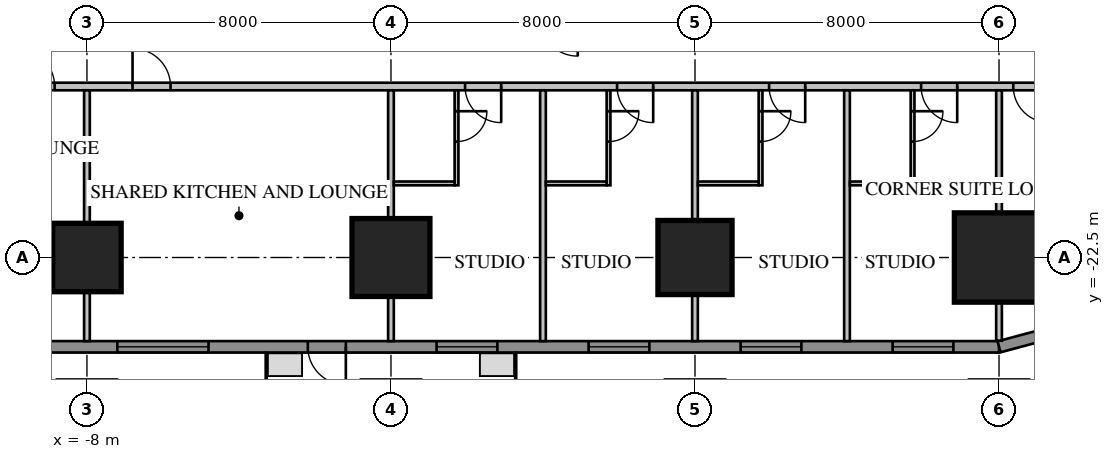
"""IFC4 building model, lengths in metres.
Left out: names, types, materials, properties, quantities, classifications, styles, units other than length and angle.
Written with IfcOpenShell. Run it as: python <this file> out.ifc"""

import sys

from ifc_helpers import new_model, si_unit, direction, frame, frame_2d, origin, origin_2d, place, context, subcontext, project, spatial, rectangle, extrude, element, fill, save


model = new_model("IFC4")
c1 = context("Model", 3, precision=1e-05, world=origin(), true_north=direction((0.0, 1.0)))
c2 = subcontext(c1, "Body", "Model", "MODEL_VIEW")
j1 = project(units=[si_unit("LENGTHUNIT", "METRE"), si_unit("PLANEANGLEUNIT", "RADIAN")], contexts=[c1])
p1 = place(None, origin())
s1 = spatial("IfcSite", under=j1, at=p1, CompositionType="ELEMENT")
p2 = place(p1, origin())
s2 = spatial("IfcBuilding", under=s1, at=p2, CompositionType="ELEMENT")
p3 = place(p2, frame((0.0, 0.0, 46.8)))
s3 = spatial("IfcBuildingStorey", under=s2, at=p3, CompositionType="ELEMENT", Elevation=46.8)
p4 = place(p3, frame((-8.0, -22.5, 0.0), z_axis=(0.0, 0.0, 1.0), x_axis=(1.0, 0.0, 0.0)))
e1 = element("IfcColumn", 1, at=p4, inside=s3, PredefinedType="COLUMN", context=c2, shape_type="SweptSolid", body=[
    extrude(rectangle(XDim=1.8, YDim=1.8, at=origin_2d()), origin(), (0.0, 0.0, 1.0), 3.85),
])
p5 = place(p3, frame((0.0, -22.5, 0.0), z_axis=(0.0, 0.0, 1.0), x_axis=(1.0, 0.0, 0.0)))
e2 = element("IfcColumn", 2, at=p5, inside=s3, PredefinedType="COLUMN", context=c2, shape_type="SweptSolid", body=[
    extrude(rectangle(XDim=2.05, YDim=2.05, at=origin_2d()), origin(), (0.0, 0.0, 1.0), 3.85),
])
p6 = place(p3, frame((8.0, -22.5, 0.0), z_axis=(0.0, 0.0, 1.0), x_axis=(1.0, 0.0, 0.0)))
e3 = element("IfcColumn", 3, at=p6, inside=s3, PredefinedType="COLUMN", context=c2, shape_type="SweptSolid", body=[
    extrude(rectangle(XDim=1.95, YDim=1.95, at=origin_2d()), origin(), (0.0, 0.0, 1.0), 3.85),
])
p7 = place(p3, frame((16.0, -22.5, 0.0), z_axis=(0.0, 0.0, 1.0), x_axis=(1.0, 0.0, 0.0)))
e4 = element("IfcColumn", 4, at=p7, inside=s3, PredefinedType="COLUMN", context=c2, shape_type="SweptSolid", body=[
    extrude(rectangle(XDim=2.35, YDim=2.35, at=origin_2d()), origin(), (0.0, 0.0, 1.0), 3.85),
])
p8 = place(p3, frame((-16.0, -24.85, 0.0), z_axis=(0.0, 0.0, 1.0), x_axis=(1.0, 0.0, 0.0)))
e5 = element("IfcWall", 5, at=p8, inside=s3, PredefinedType="SOLIDWALL", context=c2, shape_type="SweptSolid", body=[
    extrude(rectangle(XDim=32.0, YDim=0.3, at=frame_2d((16.0, 0.0))), origin(), (0.0, 0.0, 1.0), 3.65),
])
p9 = place(p8, frame((1.2, 0.0, 0.75)))
e6 = element("IfcOpeningElement", 6, at=p9, cuts=e5, PredefinedType="OPENING", context=c2, shape_type="SweptSolid", body=[
    extrude(rectangle(XDim=1.6, YDim=1.8, at=frame_2d((0.8, 0.9))), frame((0.0, 0.17, 0.0), z_axis=(0.0, -1.0, 0.0), x_axis=(1.0, 0.0, 0.0)), (0.0, 0.0, 1.0), 0.34),
])
p10 = place(p8, frame((5.2, 0.0, 0.75)))
e7 = element("IfcOpeningElement", 7, at=p10, cuts=e5, PredefinedType="OPENING", context=c2, shape_type="SweptSolid", body=[
    extrude(rectangle(XDim=1.6, YDim=1.8, at=frame_2d((0.8, 0.9))), frame((0.0, 0.17, 0.0), z_axis=(0.0, -1.0, 0.0), x_axis=(1.0, 0.0, 0.0)), (0.0, 0.0, 1.0), 0.34),
])
p11 = place(p8, frame((17.2, 0.0, 0.75)))
e8 = element("IfcOpeningElement", 8, at=p11, cuts=e5, PredefinedType="OPENING", context=c2, shape_type="SweptSolid", body=[
    extrude(rectangle(XDim=1.6, YDim=1.8, at=frame_2d((0.8, 0.9))), frame((0.0, 0.17, 0.0), z_axis=(0.0, -1.0, 0.0), x_axis=(1.0, 0.0, 0.0)), (0.0, 0.0, 1.0), 0.34),
])
p12 = place(p8, frame((21.2, 0.0, 0.75)))
e9 = element("IfcOpeningElement", 9, at=p12, cuts=e5, PredefinedType="OPENING", context=c2, shape_type="SweptSolid", body=[
    extrude(rectangle(XDim=1.6, YDim=1.8, at=frame_2d((0.8, 0.9))), frame((0.0, 0.17, 0.0), z_axis=(0.0, -1.0, 0.0), x_axis=(1.0, 0.0, 0.0)), (0.0, 0.0, 1.0), 0.34),
])
p13 = place(p8, frame((25.2, 0.0, 0.75)))
e10 = element("IfcOpeningElement", 10, at=p13, cuts=e5, PredefinedType="OPENING", context=c2, shape_type="SweptSolid", body=[
    extrude(rectangle(XDim=1.6, YDim=1.8, at=frame_2d((0.8, 0.9))), frame((0.0, 0.17, 0.0), z_axis=(0.0, -1.0, 0.0), x_axis=(1.0, 0.0, 0.0)), (0.0, 0.0, 1.0), 0.34),
])
p14 = place(p8, frame((29.2, 0.0, 0.75)))
e11 = element("IfcOpeningElement", 11, at=p14, cuts=e5, PredefinedType="OPENING", context=c2, shape_type="SweptSolid", body=[
    extrude(rectangle(XDim=1.6, YDim=1.8, at=frame_2d((0.8, 0.9))), frame((0.0, 0.17, 0.0), z_axis=(0.0, -1.0, 0.0), x_axis=(1.0, 0.0, 0.0)), (0.0, 0.0, 1.0), 0.34),
])
p15 = place(p8, frame((8.8, 0.0, 0.75)))
e12 = element("IfcOpeningElement", 12, at=p15, cuts=e5, PredefinedType="OPENING", context=c2, shape_type="SweptSolid", body=[
    extrude(rectangle(XDim=2.4, YDim=1.8, at=frame_2d((1.2, 0.9))), frame((0.0, 0.17, 0.0), z_axis=(0.0, -1.0, 0.0), x_axis=(1.0, 0.0, 0.0)), (0.0, 0.0, 1.0), 0.34),
])
p16 = place(p8, frame((13.812, 0.0, 0.0)))
e13 = element("IfcOpeningElement", 13, at=p16, cuts=e5, PredefinedType="OPENING", context=c2, shape_type="SweptSolid", body=[
    extrude(rectangle(XDim=1.0, YDim=2.4, at=frame_2d((0.5, 1.2))), frame((0.0, 0.17, 0.0), z_axis=(0.0, -1.0, 0.0), x_axis=(1.0, 0.0, 0.0)), (0.0, 0.0, 1.0), 0.34),
])
p17 = place(p3, frame((16.0, -24.85, 0.0), z_axis=(0.0, 0.0, 1.0), x_axis=(0.965920218567, 0.258839972501, 0.0)))
e14 = element("IfcWall", 14, at=p17, inside=s3, PredefinedType="SOLIDWALL", context=c2, shape_type="SweptSolid", body=[
    extrude(rectangle(XDim=4.581, YDim=0.3, at=frame_2d((2.291, 0.0))), origin(), (0.0, 0.0, 1.0), 3.65),
])
p18 = place(p3, frame((-18.0, -18.0, 0.0), z_axis=(0.0, 0.0, 1.0), x_axis=(1.0, 0.0, 0.0)))
e15 = element("IfcWall", 15, at=p18, inside=s3, PredefinedType="PARTITIONING", context=c2, shape_type="SweptSolid", body=[
    extrude(rectangle(XDim=36.0, YDim=0.2, at=frame_2d((18.0, 0.0))), origin(), (0.0, 0.0, 1.0), 3.65),
])
p19 = place(p18, frame((0.375, 0.0, 0.0)))
e16 = element("IfcOpeningElement", 16, at=p19, cuts=e15, PredefinedType="OPENING", context=c2, shape_type="SweptSolid", body=[
    extrude(rectangle(XDim=1.0, YDim=2.1, at=frame_2d((0.5, 1.05))), frame((0.0, 0.12, 0.0), z_axis=(0.0, -1.0, 0.0), x_axis=(1.0, 0.0, 0.0)), (0.0, 0.0, 1.0), 0.24),
])
p20 = place(p18, frame((2.45, 0.0, 0.0)))
e17 = element("IfcOpeningElement", 17, at=p20, cuts=e15, PredefinedType="OPENING", context=c2, shape_type="SweptSolid", body=[
    extrude(rectangle(XDim=0.8, YDim=2.1, at=frame_2d((0.4, 1.05))), frame((0.0, 0.12, 0.0), z_axis=(0.0, -1.0, 0.0), x_axis=(1.0, 0.0, 0.0)), (0.0, 0.0, 1.0), 0.24),
])
p21 = place(p18, frame((4.05, 0.0, 0.0)))
e18 = element("IfcOpeningElement", 18, at=p21, cuts=e15, PredefinedType="OPENING", context=c2, shape_type="SweptSolid", body=[
    extrude(rectangle(XDim=1.0, YDim=2.1, at=frame_2d((0.5, 1.05))), frame((0.0, 0.12, 0.0), z_axis=(0.0, -1.0, 0.0), x_axis=(1.0, 0.0, 0.0)), (0.0, 0.0, 1.0), 0.24),
])
p22 = place(p18, frame((6.45, 0.0, 0.0)))
e19 = element("IfcOpeningElement", 19, at=p22, cuts=e15, PredefinedType="OPENING", context=c2, shape_type="SweptSolid", body=[
    extrude(rectangle(XDim=0.9, YDim=2.1, at=frame_2d((0.45, 1.05))), frame((0.0, 0.12, 0.0), z_axis=(0.0, -1.0, 0.0), x_axis=(1.0, 0.0, 0.0)), (0.0, 0.0, 1.0), 0.24),
])
p23 = place(p18, frame((8.15, 0.0, 0.0)))
e20 = element("IfcOpeningElement", 20, at=p23, cuts=e15, PredefinedType="OPENING", context=c2, shape_type="SweptSolid", body=[
    extrude(rectangle(XDim=1.0, YDim=2.1, at=frame_2d((0.5, 1.05))), frame((0.0, 0.12, 0.0), z_axis=(0.0, -1.0, 0.0), x_axis=(1.0, 0.0, 0.0)), (0.0, 0.0, 1.0), 0.24),
])
p24 = place(p18, frame((19.95, 0.0, 0.0)))
e21 = element("IfcOpeningElement", 21, at=p24, cuts=e15, PredefinedType="OPENING", context=c2, shape_type="SweptSolid", body=[
    extrude(rectangle(XDim=0.95, YDim=2.1, at=frame_2d((0.475, 1.05))), frame((0.0, 0.12, 0.0), z_axis=(0.0, -1.0, 0.0), x_axis=(1.0, 0.0, 0.0)), (0.0, 0.0, 1.0), 0.24),
])
p25 = place(p18, frame((23.95, 0.0, 0.0)))
e22 = element("IfcOpeningElement", 22, at=p25, cuts=e15, PredefinedType="OPENING", context=c2, shape_type="SweptSolid", body=[
    extrude(rectangle(XDim=0.95, YDim=2.1, at=frame_2d((0.475, 1.05))), frame((0.0, 0.12, 0.0), z_axis=(0.0, -1.0, 0.0), x_axis=(1.0, 0.0, 0.0)), (0.0, 0.0, 1.0), 0.24),
])
p26 = place(p18, frame((27.95, 0.0, 0.0)))
e23 = element("IfcOpeningElement", 23, at=p26, cuts=e15, PredefinedType="OPENING", context=c2, shape_type="SweptSolid", body=[
    extrude(rectangle(XDim=0.95, YDim=2.1, at=frame_2d((0.475, 1.05))), frame((0.0, 0.12, 0.0), z_axis=(0.0, -1.0, 0.0), x_axis=(1.0, 0.0, 0.0)), (0.0, 0.0, 1.0), 0.24),
])
p27 = place(p18, frame((31.95, 0.0, 0.0)))
e24 = element("IfcOpeningElement", 24, at=p27, cuts=e15, PredefinedType="OPENING", context=c2, shape_type="SweptSolid", body=[
    extrude(rectangle(XDim=0.95, YDim=2.1, at=frame_2d((0.475, 1.05))), frame((0.0, 0.12, 0.0), z_axis=(0.0, -1.0, 0.0), x_axis=(1.0, 0.0, 0.0)), (0.0, 0.0, 1.0), 0.24),
])
p28 = place(p18, frame((34.375, 0.0, 0.0)))
e25 = element("IfcOpeningElement", 25, at=p28, cuts=e15, PredefinedType="OPENING", context=c2, shape_type="SweptSolid", body=[
    extrude(rectangle(XDim=0.95, YDim=2.1, at=frame_2d((0.475, 1.05))), frame((0.0, 0.12, 0.0), z_axis=(0.0, -1.0, 0.0), x_axis=(1.0, 0.0, 0.0)), (0.0, 0.0, 1.0), 0.24),
])
p29 = place(p18, frame((11.2, 0.0, 0.0)))
e26 = element("IfcOpeningElement", 26, at=p29, cuts=e15, PredefinedType="OPENING", context=c2, shape_type="SweptSolid", body=[
    extrude(rectangle(XDim=1.0, YDim=2.1, at=frame_2d((0.5, 1.05))), frame((0.0, 0.12, 0.0), z_axis=(0.0, -1.0, 0.0), x_axis=(1.0, 0.0, 0.0)), (0.0, 0.0, 1.0), 0.24),
])
p30 = place(p3, frame((-8.0, -18.1, 0.0), z_axis=(0.0, 0.0, 1.0), x_axis=(0.0, -1.0, 0.0)))
e27 = element("IfcWall", 27, at=p30, inside=s3, PredefinedType="PARTITIONING", context=c2, shape_type="SweptSolid", body=[
    extrude(rectangle(XDim=6.6, YDim=0.15, at=frame_2d((3.3, 0.0))), origin(), (0.0, 0.0, 1.0), 3.65),
])
p31 = place(p3, frame((0.0, -18.1, 0.0), z_axis=(0.0, 0.0, 1.0), x_axis=(0.0, -1.0, 0.0)))
e28 = element("IfcWall", 28, at=p31, inside=s3, PredefinedType="PARTITIONING", context=c2, shape_type="SweptSolid", body=[
    extrude(rectangle(XDim=6.6, YDim=0.15, at=frame_2d((3.3, 0.0))), origin(), (0.0, 0.0, 1.0), 2.809),
])
for number, where, z_axis, x_axis in (
    (29, (4.0, -18.1, 0.0), (0.0, 0.0, 1.0), (0.0, -1.0, 0.0)),
    (30, (8.0, -18.1, 0.0), (0.0, 0.0, 1.0), (0.0, -1.0, 0.0)),
    (31, (12.0, -18.1, 0.0), (0.0, 0.0, 1.0), (0.0, -1.0, 0.0)),
):
    element("IfcWall", number, at=place(p3, frame(where, z_axis=z_axis, x_axis=x_axis)), inside=s3, PredefinedType="PARTITIONING", context=c2, shape_type="SweptSolid", body=[
        extrude(rectangle(XDim=6.6, YDim=0.15, at=frame_2d((3.3, 0.0))), origin(), (0.0, 0.0, 1.0), 3.65),
    ])
p32 = place(p3, frame((16.0, -18.1, 0.0), z_axis=(0.0, 0.0, 1.0), x_axis=(0.0, -1.0, 0.0)))
e32 = element("IfcWall", 32, at=p32, inside=s3, PredefinedType="PARTITIONING", context=c2, shape_type="SweptSolid", body=[
    extrude(rectangle(XDim=6.589, YDim=0.15, at=frame_2d((3.295, 0.0))), origin(), (0.0, 0.0, 1.0), 3.65),
])
p33 = place(p3, frame((1.725, -18.1, 0.0), z_axis=(0.0, 0.0, 1.0), x_axis=(0.0, -1.0, 0.0)))
e33 = element("IfcWall", 33, at=p33, inside=s3, PredefinedType="PARTITIONING", context=c2, shape_type="SweptSolid", body=[
    extrude(rectangle(XDim=2.5, YDim=0.1, at=frame_2d((1.25, 0.0))), origin(), (0.0, 0.0, 1.0), 3.65),
])
p34 = place(p33, frame((0.55, 0.0, 0.0)))
e34 = element("IfcOpeningElement", 34, at=p34, cuts=e33, PredefinedType="OPENING", context=c2, shape_type="SweptSolid", body=[
    extrude(rectangle(XDim=0.8, YDim=2.1, at=frame_2d((0.4, 1.05))), frame((0.0, 0.07, 0.0), z_axis=(0.0, -1.0, 0.0), x_axis=(1.0, 0.0, 0.0)), (0.0, 0.0, 1.0), 0.14),
])
p35 = place(p3, frame((0.075, -20.55, 0.0), z_axis=(0.0, 0.0, 1.0), x_axis=(1.0, 0.0, 0.0)))
e35 = element("IfcWall", 35, at=p35, inside=s3, PredefinedType="PARTITIONING", context=c2, shape_type="SweptSolid", body=[
    extrude(rectangle(XDim=1.6, YDim=0.1, at=frame_2d((0.8, 0.0))), origin(), (0.0, 0.0, 1.0), 3.65),
])
p36 = place(p3, frame((5.725, -18.1, 0.0), z_axis=(0.0, 0.0, 1.0), x_axis=(0.0, -1.0, 0.0)))
e36 = element("IfcWall", 36, at=p36, inside=s3, PredefinedType="PARTITIONING", context=c2, shape_type="SweptSolid", body=[
    extrude(rectangle(XDim=2.5, YDim=0.1, at=frame_2d((1.25, 0.0))), origin(), (0.0, 0.0, 1.0), 3.65),
])
p37 = place(p36, frame((0.55, 0.0, 0.0)))
e37 = element("IfcOpeningElement", 37, at=p37, cuts=e36, PredefinedType="OPENING", context=c2, shape_type="SweptSolid", body=[
    extrude(rectangle(XDim=0.8, YDim=2.1, at=frame_2d((0.4, 1.05))), frame((0.0, 0.07, 0.0), z_axis=(0.0, -1.0, 0.0), x_axis=(1.0, 0.0, 0.0)), (0.0, 0.0, 1.0), 0.14),
])
p38 = place(p3, frame((4.075, -20.55, 0.0), z_axis=(0.0, 0.0, 1.0), x_axis=(1.0, 0.0, 0.0)))
e38 = element("IfcWall", 38, at=p38, inside=s3, PredefinedType="PARTITIONING", context=c2, shape_type="SweptSolid", body=[
    extrude(rectangle(XDim=1.6, YDim=0.1, at=frame_2d((0.8, 0.0))), origin(), (0.0, 0.0, 1.0), 3.65),
])
p39 = place(p3, frame((9.725, -18.1, 0.0), z_axis=(0.0, 0.0, 1.0), x_axis=(0.0, -1.0, 0.0)))
e39 = element("IfcWall", 39, at=p39, inside=s3, PredefinedType="PARTITIONING", context=c2, shape_type="SweptSolid", body=[
    extrude(rectangle(XDim=2.5, YDim=0.1, at=frame_2d((1.25, 0.0))), origin(), (0.0, 0.0, 1.0), 3.65),
])
p40 = place(p39, frame((0.55, 0.0, 0.0)))
e40 = element("IfcOpeningElement", 40, at=p40, cuts=e39, PredefinedType="OPENING", context=c2, shape_type="SweptSolid", body=[
    extrude(rectangle(XDim=0.8, YDim=2.1, at=frame_2d((0.4, 1.05))), frame((0.0, 0.07, 0.0), z_axis=(0.0, -1.0, 0.0), x_axis=(1.0, 0.0, 0.0)), (0.0, 0.0, 1.0), 0.14),
])
p41 = place(p3, frame((8.075, -20.55, 0.0), z_axis=(0.0, 0.0, 1.0), x_axis=(1.0, 0.0, 0.0)))
e41 = element("IfcWall", 41, at=p41, inside=s3, PredefinedType="PARTITIONING", context=c2, shape_type="SweptSolid", body=[
    extrude(rectangle(XDim=1.6, YDim=0.1, at=frame_2d((0.8, 0.0))), origin(), (0.0, 0.0, 1.0), 3.65),
])
p42 = place(p3, frame((13.725, -18.1, 0.0), z_axis=(0.0, 0.0, 1.0), x_axis=(0.0, -1.0, 0.0)))
e42 = element("IfcWall", 42, at=p42, inside=s3, PredefinedType="PARTITIONING", context=c2, shape_type="SweptSolid", body=[
    extrude(rectangle(XDim=2.5, YDim=0.1, at=frame_2d((1.25, 0.0))), origin(), (0.0, 0.0, 1.0), 3.65),
])
p43 = place(p42, frame((0.55, 0.0, 0.0)))
e43 = element("IfcOpeningElement", 43, at=p43, cuts=e42, PredefinedType="OPENING", context=c2, shape_type="SweptSolid", body=[
    extrude(rectangle(XDim=0.8, YDim=2.1, at=frame_2d((0.4, 1.05))), frame((0.0, 0.07, 0.0), z_axis=(0.0, -1.0, 0.0), x_axis=(1.0, 0.0, 0.0)), (0.0, 0.0, 1.0), 0.14),
])
p44 = place(p3, frame((12.075, -20.55, 0.0), z_axis=(0.0, 0.0, 1.0), x_axis=(1.0, 0.0, 0.0)))
e44 = element("IfcWall", 44, at=p44, inside=s3, PredefinedType="PARTITIONING", context=c2, shape_type="SweptSolid", body=[
    extrude(rectangle(XDim=1.6, YDim=0.1, at=frame_2d((0.8, 0.0))), origin(), (0.0, 0.0, 1.0), 3.65),
])
p45 = place(p11, origin())
e45 = element("IfcWindow", 45, at=p45, inside=s3, PartitioningType="SINGLE_PANEL", PredefinedType="WINDOW", context=c2, shape_type="SweptSolid", body=[
    extrude(rectangle(XDim=1.6, YDim=1.8, at=frame_2d((0.8, 0.9))), frame((0.0, 0.03, 0.0), z_axis=(0.0, -1.0, 0.0), x_axis=(1.0, 0.0, 0.0)), (0.0, 0.0, 1.0), 0.06),
])
fill(e8, e45)
p46 = place(p12, origin())
e46 = element("IfcWindow", 46, at=p46, inside=s3, PartitioningType="SINGLE_PANEL", PredefinedType="WINDOW", context=c2, shape_type="SweptSolid", body=[
    extrude(rectangle(XDim=1.6, YDim=1.8, at=frame_2d((0.8, 0.9))), frame((0.0, 0.03, 0.0), z_axis=(0.0, -1.0, 0.0), x_axis=(1.0, 0.0, 0.0)), (0.0, 0.0, 1.0), 0.06),
])
fill(e9, e46)
p47 = place(p13, origin())
e47 = element("IfcWindow", 47, at=p47, inside=s3, PartitioningType="SINGLE_PANEL", PredefinedType="WINDOW", context=c2, shape_type="SweptSolid", body=[
    extrude(rectangle(XDim=1.6, YDim=1.8, at=frame_2d((0.8, 0.9))), frame((0.0, 0.03, 0.0), z_axis=(0.0, -1.0, 0.0), x_axis=(1.0, 0.0, 0.0)), (0.0, 0.0, 1.0), 0.06),
])
fill(e10, e47)
p48 = place(p14, origin())
e48 = element("IfcWindow", 48, at=p48, inside=s3, PartitioningType="SINGLE_PANEL", PredefinedType="WINDOW", context=c2, shape_type="SweptSolid", body=[
    extrude(rectangle(XDim=1.6, YDim=1.8, at=frame_2d((0.8, 0.9))), frame((0.0, 0.03, 0.0), z_axis=(0.0, -1.0, 0.0), x_axis=(1.0, 0.0, 0.0)), (0.0, 0.0, 1.0), 0.06),
])
fill(e11, e48)
p49 = place(p15, origin())
e49 = element("IfcWindow", 49, at=p49, inside=s3, PartitioningType="SINGLE_PANEL", PredefinedType="WINDOW", context=c2, shape_type="SweptSolid", body=[
    extrude(rectangle(XDim=2.4, YDim=1.8, at=frame_2d((1.2, 0.9))), frame((0.0, 0.03, 0.0), z_axis=(0.0, -1.0, 0.0), x_axis=(1.0, 0.0, 0.0)), (0.0, 0.0, 1.0), 0.06),
])
fill(e12, e49)
p50 = place(p16, origin())
e50 = element("IfcDoor", 50, at=p50, inside=s3, OperationType="SINGLE_SWING_RIGHT", PredefinedType="DOOR", context=c2, shape_type="SweptSolid", body=[
    extrude(rectangle(XDim=1.0, YDim=2.4, at=frame_2d((0.5, 1.2))), frame((0.0, 0.025, 0.0), z_axis=(0.0, -1.0, 0.0), x_axis=(1.0, 0.0, 0.0)), (0.0, 0.0, 1.0), 0.05),
])
fill(e13, e50)
p51 = place(p23, origin())
e51 = element("IfcDoor", 51, at=p51, inside=s3, OperationType="SINGLE_SWING_LEFT", PredefinedType="DOOR", context=c2, shape_type="SweptSolid", body=[
    extrude(rectangle(XDim=1.0, YDim=2.1, at=frame_2d((0.5, 1.05))), frame((0.0, 0.025, 0.0), z_axis=(0.0, -1.0, 0.0), x_axis=(1.0, 0.0, 0.0)), (0.0, 0.0, 1.0), 0.05),
])
fill(e20, e51)
p52 = place(p24, origin())
e52 = element("IfcDoor", 52, at=p52, inside=s3, OperationType="SINGLE_SWING_RIGHT", PredefinedType="DOOR", context=c2, shape_type="SweptSolid", body=[
    extrude(rectangle(XDim=0.95, YDim=2.1, at=frame_2d((0.475, 1.05))), frame((0.0, 0.025, 0.0), z_axis=(0.0, -1.0, 0.0), x_axis=(1.0, 0.0, 0.0)), (0.0, 0.0, 1.0), 0.05),
])
fill(e21, e52)
p53 = place(p34, origin())
e53 = element("IfcDoor", 53, at=p53, inside=s3, OperationType="SINGLE_SWING_LEFT", PredefinedType="DOOR", context=c2, shape_type="SweptSolid", body=[
    extrude(rectangle(XDim=0.8, YDim=2.1, at=frame_2d((0.4, 1.05))), frame((0.0, 0.025, 0.0), z_axis=(0.0, -1.0, 0.0), x_axis=(1.0, 0.0, 0.0)), (0.0, 0.0, 1.0), 0.05),
])
fill(e34, e53)
p54 = place(p25, origin())
e54 = element("IfcDoor", 54, at=p54, inside=s3, OperationType="SINGLE_SWING_RIGHT", PredefinedType="DOOR", context=c2, shape_type="SweptSolid", body=[
    extrude(rectangle(XDim=0.95, YDim=2.1, at=frame_2d((0.475, 1.05))), frame((0.0, 0.025, 0.0), z_axis=(0.0, -1.0, 0.0), x_axis=(1.0, 0.0, 0.0)), (0.0, 0.0, 1.0), 0.05),
])
fill(e22, e54)
p55 = place(p37, origin())
e55 = element("IfcDoor", 55, at=p55, inside=s3, OperationType="SINGLE_SWING_LEFT", PredefinedType="DOOR", context=c2, shape_type="SweptSolid", body=[
    extrude(rectangle(XDim=0.8, YDim=2.1, at=frame_2d((0.4, 1.05))), frame((0.0, 0.025, 0.0), z_axis=(0.0, -1.0, 0.0), x_axis=(1.0, 0.0, 0.0)), (0.0, 0.0, 1.0), 0.05),
])
fill(e37, e55)
p56 = place(p26, origin())
e56 = element("IfcDoor", 56, at=p56, inside=s3, OperationType="SINGLE_SWING_RIGHT", PredefinedType="DOOR", context=c2, shape_type="SweptSolid", body=[
    extrude(rectangle(XDim=0.95, YDim=2.1, at=frame_2d((0.475, 1.05))), frame((0.0, 0.025, 0.0), z_axis=(0.0, -1.0, 0.0), x_axis=(1.0, 0.0, 0.0)), (0.0, 0.0, 1.0), 0.05),
])
fill(e23, e56)
p57 = place(p40, origin())
e57 = element("IfcDoor", 57, at=p57, inside=s3, OperationType="SINGLE_SWING_LEFT", PredefinedType="DOOR", context=c2, shape_type="SweptSolid", body=[
    extrude(rectangle(XDim=0.8, YDim=2.1, at=frame_2d((0.4, 1.05))), frame((0.0, 0.025, 0.0), z_axis=(0.0, -1.0, 0.0), x_axis=(1.0, 0.0, 0.0)), (0.0, 0.0, 1.0), 0.05),
])
fill(e40, e57)
p58 = place(p27, origin())
e58 = element("IfcDoor", 58, at=p58, inside=s3, OperationType="SINGLE_SWING_RIGHT", PredefinedType="DOOR", context=c2, shape_type="SweptSolid", body=[
    extrude(rectangle(XDim=0.95, YDim=2.1, at=frame_2d((0.475, 1.05))), frame((0.0, 0.025, 0.0), z_axis=(0.0, -1.0, 0.0), x_axis=(1.0, 0.0, 0.0)), (0.0, 0.0, 1.0), 0.05),
])
fill(e24, e58)
p59 = place(p43, origin())
e59 = element("IfcDoor", 59, at=p59, inside=s3, OperationType="SINGLE_SWING_LEFT", PredefinedType="DOOR", context=c2, shape_type="SweptSolid", body=[
    extrude(rectangle(XDim=0.8, YDim=2.1, at=frame_2d((0.4, 1.05))), frame((0.0, 0.025, 0.0), z_axis=(0.0, -1.0, 0.0), x_axis=(1.0, 0.0, 0.0)), (0.0, 0.0, 1.0), 0.05),
])
fill(e43, e59)
p60 = place(p28, origin())
e60 = element("IfcDoor", 60, at=p60, inside=s3, OperationType="SINGLE_SWING_RIGHT", PredefinedType="DOOR", context=c2, shape_type="SweptSolid", body=[
    extrude(rectangle(XDim=0.95, YDim=2.1, at=frame_2d((0.475, 1.05))), frame((0.0, 0.025, 0.0), z_axis=(0.0, -1.0, 0.0), x_axis=(1.0, 0.0, 0.0)), (0.0, 0.0, 1.0), 0.05),
])
fill(e25, e60)
p61 = place(p29, origin())
e61 = element("IfcDoor", 61, at=p61, inside=s3, OperationType="SINGLE_SWING_LEFT", PredefinedType="DOOR", context=c2, shape_type="SweptSolid", body=[
    extrude(rectangle(XDim=1.0, YDim=2.1, at=frame_2d((0.5, 1.05))), frame((0.0, 0.025, 0.0), z_axis=(0.0, -1.0, 0.0), x_axis=(1.0, 0.0, 0.0)), (0.0, 0.0, 1.0), 0.05),
])
fill(e26, e61)
save(model, sys.argv[1])
